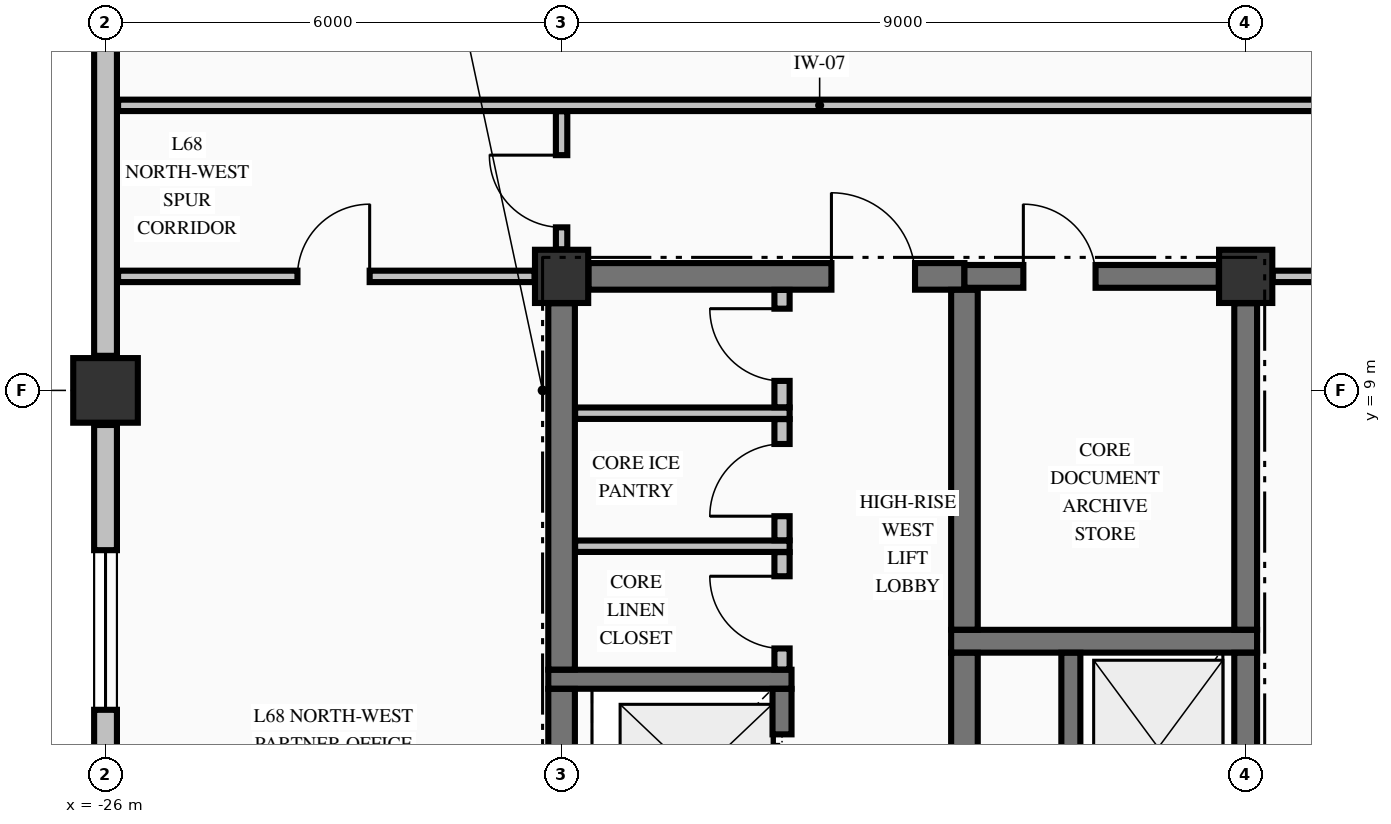
"""IFC4 building model, lengths in metres.
Left out: names, types, materials, properties, quantities, classifications, styles, units other than length and angle.
Written with IfcOpenShell. Run it as: python <this file> out.ifc"""

import sys

from ifc_helpers import new_model, si_unit, direction, frame, frame_2d, origin, origin_2d, place, context, subcontext, project, spatial, rectangle, extrude, element, fill, save


model = new_model("IFC4")
c1 = context("Model", 3, precision=1e-05, world=origin(), true_north=direction((0.0, 1.0)))
c2 = subcontext(c1, "Body", "Model", "MODEL_VIEW")
j1 = project(units=[si_unit("LENGTHUNIT", "METRE"), si_unit("PLANEANGLEUNIT", "RADIAN")], contexts=[c1])
p1 = place(None, origin())
s1 = spatial("IfcSite", under=j1, at=p1, CompositionType="ELEMENT")
p2 = place(p1, origin())
s2 = spatial("IfcBuilding", under=s1, at=p2, CompositionType="ELEMENT")
p3 = place(p2, frame((0.0, 0.0, 257.66)))
s3 = spatial("IfcBuildingStorey", under=s2, at=p3, CompositionType="ELEMENT", Elevation=257.66)
p4 = place(p3, frame((-26.0, 9.0, -0.25), z_axis=(0.0, 0.0, 1.0), x_axis=(1.0, 0.0, 0.0)))
e1 = element("IfcColumn", 1, at=p4, inside=s3, PredefinedType="COLUMN", context=c2, shape_type="SweptSolid", body=[
    extrude(rectangle(XDim=0.85, YDim=0.85, at=origin_2d()), origin(), (0.0, 0.0, 1.0), 3.23),
])
for number, where, z_axis, x_axis in (
    (2, (-20.0, 10.5, -0.25), (0.0, 0.0, 1.0), (1.0, 0.0, 0.0)),
    (3, (-11.0, 10.5, -0.25), (0.0, 0.0, 1.0), (1.0, 0.0, 0.0)),
):
    element("IfcColumn", number, at=place(p3, frame(where, z_axis=z_axis, x_axis=x_axis)), inside=s3, PredefinedType="COLUMN", context=c2, shape_type="SweptSolid", body=[
        extrude(rectangle(XDim=0.7, YDim=0.7, at=origin_2d()), origin(), (0.0, 0.0, 1.0), 3.23),
    ])
p5 = place(p3, frame((-26.0, 8.545, 0.0), z_axis=(0.0, 0.0, 1.0), x_axis=(0.0, -1.0, 0.0)))
e4 = element("IfcWall", 4, at=p5, inside=s3, PredefinedType="STANDARD", context=c2, shape_type="SweptSolid", body=[
    extrude(rectangle(XDim=8.09, YDim=0.3, at=frame_2d((4.045, 0.0))), origin(), (0.0, 0.0, 1.0), 2.372),
])
p6 = place(p5, frame((1.647, 0.0, 0.7)))
e5 = element("IfcOpeningElement", 5, at=p6, cuts=e4, PredefinedType="OPENING", context=c2, shape_type="SweptSolid", body=[
    extrude(rectangle(XDim=2.1, YDim=1.5, at=frame_2d((1.05, 0.75))), frame((0.0, 0.16, 0.0), z_axis=(0.0, -1.0, 0.0), x_axis=(1.0, 0.0, 0.0)), (0.0, 0.0, 1.0), 0.32),
])
p7 = place(p5, frame((4.343, 0.0, 0.7)))
e6 = element("IfcOpeningElement", 6, at=p7, cuts=e4, PredefinedType="OPENING", context=c2, shape_type="SweptSolid", body=[
    extrude(rectangle(XDim=2.1, YDim=1.5, at=frame_2d((1.05, 0.75))), frame((0.0, 0.16, 0.0), z_axis=(0.0, -1.0, 0.0), x_axis=(1.0, 0.0, 0.0)), (0.0, 0.0, 1.0), 0.32),
])
p8 = place(p3, frame((-26.0, 17.545, 0.0), z_axis=(0.0, 0.0, 1.0), x_axis=(0.0, -1.0, 0.0)))
e7 = element("IfcWall", 7, at=p8, inside=s3, PredefinedType="STANDARD", context=c2, shape_type="SweptSolid", body=[
    extrude(rectangle(XDim=8.09, YDim=0.3, at=frame_2d((4.045, 0.0))), origin(), (0.0, 0.0, 1.0), 2.372),
])
p9 = place(p3, frame((-20.175, 5.2, 0.0), z_axis=(0.0, 0.0, 1.0), x_axis=(1.0, 0.0, 0.0)))
e8 = element("IfcWall", 8, at=p9, inside=s3, PredefinedType="SOLIDWALL", context=c2, shape_type="SweptSolid", body=[
    extrude(rectangle(XDim=3.2, YDim=0.25, at=frame_2d((1.6, 0.0))), origin(), (0.0, 0.0, 1.0), 2.98),
])
p10 = place(p3, frame((-14.875, 5.7, 0.0), z_axis=(0.0, 0.0, 1.0), x_axis=(1.0, 0.0, 0.0)))
e9 = element("IfcWall", 9, at=p10, inside=s3, PredefinedType="SHEAR", context=c2, shape_type="SweptSolid", body=[
    extrude(rectangle(XDim=4.025, YDim=0.3, at=frame_2d((2.012, 0.0))), origin(), (0.0, 0.0, 1.0), 2.98),
])
p11 = place(p3, frame((-19.646, 10.5, 0.0), z_axis=(0.0, 0.0, 1.0), x_axis=(1.0, 0.0, 0.0)))
e10 = element("IfcWall", 10, at=p11, inside=s3, PredefinedType="SHEAR", context=c2, shape_type="SweptSolid", body=[
    extrude(rectangle(XDim=4.946, YDim=0.35, at=frame_2d((2.473, 0.0))), origin(), (0.0, 0.0, 1.0), 2.98),
])
p12 = place(p11, frame((3.196, 0.0, 0.0)))
e11 = element("IfcOpeningElement", 11, at=p12, cuts=e10, PredefinedType="OPENING", context=c2, shape_type="SweptSolid", body=[
    extrude(rectangle(XDim=1.1, YDim=2.15, at=frame_2d((0.55, 1.075))), frame((0.0, 0.185, 0.0), z_axis=(0.0, -1.0, 0.0), x_axis=(1.0, 0.0, 0.0)), (0.0, 0.0, 1.0), 0.37),
])
p13 = place(p3, frame((-14.7, 10.5, 0.0), z_axis=(0.0, 0.0, 1.0), x_axis=(1.0, 0.0, 0.0)))
e12 = element("IfcWall", 12, at=p13, inside=s3, PredefinedType="SHEAR", context=c2, shape_type="SweptSolid", body=[
    extrude(rectangle(XDim=3.346, YDim=0.3, at=frame_2d((1.673, 0.0))), origin(), (0.0, 0.0, 1.0), 2.98),
])
p14 = place(p13, frame((0.775, 0.0, 0.0)))
e13 = element("IfcOpeningElement", 13, at=p14, cuts=e12, PredefinedType="OPENING", context=c2, shape_type="SweptSolid", body=[
    extrude(rectangle(XDim=0.95, YDim=2.15, at=frame_2d((0.475, 1.075))), frame((0.0, 0.16, 0.0), z_axis=(0.0, -1.0, 0.0), x_axis=(1.0, 0.0, 0.0)), (0.0, 0.0, 1.0), 0.32),
])
for number, where, z_axis, x_axis in (
    (14, (-19.822, 6.95, 0.0), (0.0, 0.0, 1.0), (1.0, 0.0, 0.0)),
    (15, (-19.822, 8.7, 0.0), (0.0, 0.0, 1.0), (1.0, 0.0, 0.0)),
):
    element("IfcWall", number, at=place(p3, frame(where, z_axis=z_axis, x_axis=x_axis)), inside=s3, PredefinedType="PARTITIONING", context=c2, shape_type="SweptSolid", body=[
        extrude(rectangle(XDim=2.822, YDim=0.15, at=frame_2d((1.411, 0.0))), origin(), (0.0, 0.0, 1.0), 2.98),
    ])
p15 = place(p3, frame((-25.835, 10.5, 0.0), z_axis=(0.0, 0.0, 1.0), x_axis=(1.0, 0.0, 0.0)))
e16 = element("IfcWall", 16, at=p15, inside=s3, PredefinedType="PARTITIONING", context=c2, shape_type="SweptSolid", body=[
    extrude(rectangle(XDim=5.479, YDim=0.15, at=frame_2d((2.74, 0.0))), origin(), (0.0, 0.0, 1.0), 2.98),
])
p16 = place(p15, frame((2.36, 0.0, 0.0)))
e17 = element("IfcOpeningElement", 17, at=p16, cuts=e16, PredefinedType="OPENING", context=c2, shape_type="SweptSolid", body=[
    extrude(rectangle(XDim=0.95, YDim=2.15, at=frame_2d((0.475, 1.075))), frame((0.0, 0.085, 0.0), z_axis=(0.0, -1.0, 0.0), x_axis=(1.0, 0.0, 0.0)), (0.0, 0.0, 1.0), 0.17),
])
p17 = place(p3, frame((-10.644, 10.5, 0.0), z_axis=(0.0, 0.0, 1.0), x_axis=(1.0, 0.0, 0.0)))
e18 = element("IfcWall", 18, at=p17, inside=s3, PredefinedType="PARTITIONING", context=c2, shape_type="SweptSolid", body=[
    extrude(rectangle(XDim=21.288, YDim=0.15, at=frame_2d((10.644, 0.0))), origin(), (0.0, 0.0, 1.0), 2.98),
])
p18 = place(p17, frame((12.744, 0.0, 0.0)))
e19 = element("IfcOpeningElement", 19, at=p18, cuts=e18, PredefinedType="OPENING", context=c2, shape_type="SweptSolid", body=[
    extrude(rectangle(XDim=1.1, YDim=2.15, at=frame_2d((0.55, 1.075))), frame((0.0, 0.085, 0.0), z_axis=(0.0, -1.0, 0.0), x_axis=(1.0, 0.0, 0.0)), (0.0, 0.0, 1.0), 0.17),
])
p19 = place(p3, frame((-25.835, 12.75, 0.0), z_axis=(0.0, 0.0, 1.0), x_axis=(1.0, 0.0, 0.0)))
e20 = element("IfcWall", 20, at=p19, inside=s3, PredefinedType="PARTITIONING", context=c2, shape_type="SweptSolid", body=[
    extrude(rectangle(XDim=45.91, YDim=0.15, at=frame_2d((22.955, 0.0))), origin(), (0.0, 0.0, 1.0), 2.98),
])
p20 = place(p19, frame((18.46, 0.0, 0.0)))
e21 = element("IfcOpeningElement", 21, at=p20, cuts=e20, PredefinedType="OPENING", context=c2, shape_type="SweptSolid", body=[
    extrude(rectangle(XDim=1.05, YDim=2.15, at=frame_2d((0.525, 1.075))), frame((0.0, 0.085, 0.0), z_axis=(0.0, -1.0, 0.0), x_axis=(1.0, 0.0, 0.0)), (0.0, 0.0, 1.0), 0.17),
])
p21 = place(p19, frame((28.86, 0.0, 0.0)))
e22 = element("IfcOpeningElement", 22, at=p21, cuts=e20, PredefinedType="OPENING", context=c2, shape_type="SweptSolid", body=[
    extrude(rectangle(XDim=1.05, YDim=2.15, at=frame_2d((0.525, 1.075))), frame((0.0, 0.085, 0.0), z_axis=(0.0, -1.0, 0.0), x_axis=(1.0, 0.0, 0.0)), (0.0, 0.0, 1.0), 0.17),
])
p22 = place(p19, frame((39.16, 0.0, 0.0)))
e23 = element("IfcOpeningElement", 23, at=p22, cuts=e20, PredefinedType="OPENING", context=c2, shape_type="SweptSolid", body=[
    extrude(rectangle(XDim=1.05, YDim=2.15, at=frame_2d((0.525, 1.075))), frame((0.0, 0.085, 0.0), z_axis=(0.0, -1.0, 0.0), x_axis=(1.0, 0.0, 0.0)), (0.0, 0.0, 1.0), 0.17),
])
p23 = place(p3, frame((-20.0, 2.777, 0.0), z_axis=(0.0, 0.0, 1.0), x_axis=(0.0, 1.0, 0.0)))
e24 = element("IfcWall", 24, at=p23, inside=s3, PredefinedType="SHEAR", context=c2, shape_type="SweptSolid", body=[
    extrude(rectangle(XDim=2.296, YDim=0.35, at=frame_2d((1.148, 0.0))), origin(), (0.0, 0.0, 1.0), 2.98),
])
p24 = place(p3, frame((-20.0, 5.327, 0.0), z_axis=(0.0, 0.0, 1.0), x_axis=(0.0, 1.0, 0.0)))
e25 = element("IfcWall", 25, at=p24, inside=s3, PredefinedType="SHEAR", context=c2, shape_type="SweptSolid", body=[
    extrude(rectangle(XDim=4.819, YDim=0.35, at=frame_2d((2.41, 0.0))), origin(), (0.0, 0.0, 1.0), 2.98),
])
p25 = place(p3, frame((-17.1, 2.777, 0.0), z_axis=(0.0, 0.0, 1.0), x_axis=(0.0, 1.0, 0.0)))
e26 = element("IfcWall", 26, at=p25, inside=s3, PredefinedType="SOLIDWALL", context=c2, shape_type="SweptSolid", body=[
    extrude(rectangle(XDim=2.296, YDim=0.25, at=frame_2d((1.148, 0.0))), origin(), (0.0, 0.0, 1.0), 2.98),
])
p26 = place(p25, frame((0.598, 0.0, 0.0)))
e27 = element("IfcOpeningElement", 27, at=p26, cuts=e26, PredefinedType="OPENING", context=c2, shape_type="SweptSolid", body=[
    extrude(rectangle(XDim=1.1, YDim=2.2, at=frame_2d((0.55, 1.1))), frame((0.0, 0.135, 0.0), z_axis=(0.0, -1.0, 0.0), x_axis=(1.0, 0.0, 0.0)), (0.0, 0.0, 1.0), 0.27),
])
p27 = place(p3, frame((-14.7, 3.052, 0.0), z_axis=(0.0, 0.0, 1.0), x_axis=(0.0, 1.0, 0.0)))
e28 = element("IfcWall", 28, at=p27, inside=s3, PredefinedType="SHEAR", context=c2, shape_type="SweptSolid", body=[
    extrude(rectangle(XDim=2.496, YDim=0.35, at=frame_2d((1.248, 0.0))), origin(), (0.0, 0.0, 1.0), 2.98),
])
p28 = place(p3, frame((-14.7, 5.852, 0.0), z_axis=(0.0, 0.0, 1.0), x_axis=(0.0, 1.0, 0.0)))
e29 = element("IfcWall", 29, at=p28, inside=s3, PredefinedType="SHEAR", context=c2, shape_type="SweptSolid", body=[
    extrude(rectangle(XDim=4.471, YDim=0.35, at=frame_2d((2.235, 0.0))), origin(), (0.0, 0.0, 1.0), 2.98),
])
p29 = place(p3, frame((-13.3, 3.052, 0.0), z_axis=(0.0, 0.0, 1.0), x_axis=(0.0, 1.0, 0.0)))
e30 = element("IfcWall", 30, at=p29, inside=s3, PredefinedType="SOLIDWALL", context=c2, shape_type="SweptSolid", body=[
    extrude(rectangle(XDim=2.496, YDim=0.25, at=frame_2d((1.248, 0.0))), origin(), (0.0, 0.0, 1.0), 2.98),
])
p30 = place(p3, frame((-11.0, 3.052, 0.0), z_axis=(0.0, 0.0, 1.0), x_axis=(0.0, 1.0, 0.0)))
e31 = element("IfcWall", 31, at=p30, inside=s3, PredefinedType="SHEAR", context=c2, shape_type="SweptSolid", body=[
    extrude(rectangle(XDim=2.496, YDim=0.3, at=frame_2d((1.248, 0.0))), origin(), (0.0, 0.0, 1.0), 2.98),
])
p31 = place(p3, frame((-11.0, 5.852, 0.0), z_axis=(0.0, 0.0, 1.0), x_axis=(0.0, 1.0, 0.0)))
e32 = element("IfcWall", 32, at=p31, inside=s3, PredefinedType="SHEAR", context=c2, shape_type="SweptSolid", body=[
    extrude(rectangle(XDim=4.294, YDim=0.3, at=frame_2d((2.147, 0.0))), origin(), (0.0, 0.0, 1.0), 2.98),
])
p32 = place(p3, frame((-20.0, 10.856, 0.0), z_axis=(0.0, 0.0, 1.0), x_axis=(0.0, 1.0, 0.0)))
e33 = element("IfcWall", 33, at=p32, inside=s3, PredefinedType="PARTITIONING", context=c2, shape_type="SweptSolid", body=[
    extrude(rectangle(XDim=1.816, YDim=0.15, at=frame_2d((0.908, 0.0))), origin(), (0.0, 0.0, 1.0), 2.98),
])
p33 = place(p32, frame((0.289, 0.0, 0.0)))
e34 = element("IfcOpeningElement", 34, at=p33, cuts=e33, PredefinedType="OPENING", context=c2, shape_type="SweptSolid", body=[
    extrude(rectangle(XDim=0.95, YDim=2.15, at=frame_2d((0.475, 1.075))), frame((0.0, 0.085, 0.0), z_axis=(0.0, -1.0, 0.0), x_axis=(1.0, 0.0, 0.0)), (0.0, 0.0, 1.0), 0.17),
])
p34 = place(p3, frame((-17.1, 5.328, 0.0), z_axis=(0.0, 0.0, 1.0), x_axis=(0.0, 1.0, 0.0)))
e35 = element("IfcWall", 35, at=p34, inside=s3, PredefinedType="PARTITIONING", context=c2, shape_type="SweptSolid", body=[
    extrude(rectangle(XDim=1.544, YDim=0.2, at=frame_2d((0.772, 0.0))), origin(), (0.0, 0.0, 1.0), 2.98),
])
p35 = place(p34, frame((0.277, 0.0, 0.0)))
e36 = element("IfcOpeningElement", 36, at=p35, cuts=e35, PredefinedType="OPENING", context=c2, shape_type="SweptSolid", body=[
    extrude(rectangle(XDim=0.95, YDim=2.15, at=frame_2d((0.475, 1.075))), frame((0.0, 0.11, 0.0), z_axis=(0.0, -1.0, 0.0), x_axis=(1.0, 0.0, 0.0)), (0.0, 0.0, 1.0), 0.22),
])
p36 = place(p3, frame((-17.1, 7.028, 0.0), z_axis=(0.0, 0.0, 1.0), x_axis=(0.0, 1.0, 0.0)))
e37 = element("IfcWall", 37, at=p36, inside=s3, PredefinedType="PARTITIONING", context=c2, shape_type="SweptSolid", body=[
    extrude(rectangle(XDim=1.594, YDim=0.2, at=frame_2d((0.797, 0.0))), origin(), (0.0, 0.0, 1.0), 2.98),
])
p37 = place(p36, frame((0.317, 0.0, 0.0)))
e38 = element("IfcOpeningElement", 38, at=p37, cuts=e37, PredefinedType="OPENING", context=c2, shape_type="SweptSolid", body=[
    extrude(rectangle(XDim=0.95, YDim=2.15, at=frame_2d((0.475, 1.075))), frame((0.0, 0.11, 0.0), z_axis=(0.0, -1.0, 0.0), x_axis=(1.0, 0.0, 0.0)), (0.0, 0.0, 1.0), 0.22),
])
p38 = place(p3, frame((-17.1, 8.778, 0.0), z_axis=(0.0, 0.0, 1.0), x_axis=(0.0, 1.0, 0.0)))
e39 = element("IfcWall", 39, at=p38, inside=s3, PredefinedType="PARTITIONING", context=c2, shape_type="SweptSolid", body=[
    extrude(rectangle(XDim=1.544, YDim=0.2, at=frame_2d((0.772, 0.0))), origin(), (0.0, 0.0, 1.0), 2.98),
])
p39 = place(p38, frame((0.347, 0.0, 0.0)))
e40 = element("IfcOpeningElement", 40, at=p39, cuts=e39, PredefinedType="OPENING", context=c2, shape_type="SweptSolid", body=[
    extrude(rectangle(XDim=0.95, YDim=2.15, at=frame_2d((0.475, 1.075))), frame((0.0, 0.11, 0.0), z_axis=(0.0, -1.0, 0.0), x_axis=(1.0, 0.0, 0.0)), (0.0, 0.0, 1.0), 0.22),
])
p40 = place(p6, origin())
e41 = element("IfcWindow", 41, at=p40, inside=s3, PartitioningType="SINGLE_PANEL", PredefinedType="WINDOW", context=c2, shape_type="SweptSolid", body=[
    extrude(rectangle(XDim=2.1, YDim=1.5, at=frame_2d((1.05, 0.75))), frame((0.0, 0.03, 0.0), z_axis=(0.0, -1.0, 0.0), x_axis=(1.0, 0.0, 0.0)), (0.0, 0.0, 1.0), 0.06),
])
fill(e5, e41)
p41 = place(p14, origin())
e42 = element("IfcDoor", 42, at=p41, inside=s3, OperationType="SINGLE_SWING_LEFT", PredefinedType="DOOR", context=c2, shape_type="SweptSolid", body=[
    extrude(rectangle(XDim=0.95, YDim=2.15, at=frame_2d((0.475, 1.075))), frame((0.0, 0.025, 0.0), z_axis=(0.0, -1.0, 0.0), x_axis=(1.0, 0.0, 0.0)), (0.0, 0.0, 1.0), 0.05),
])
fill(e13, e42)
p42 = place(p26, origin())
e43 = element("IfcDoor", 43, at=p42, inside=s3, OperationType="SLIDING_TO_LEFT", PredefinedType="DOOR", context=c2, shape_type="SweptSolid", body=[
    extrude(rectangle(XDim=1.1, YDim=2.2, at=frame_2d((0.55, 1.1))), frame((0.0, 0.025, 0.0), z_axis=(0.0, -1.0, 0.0), x_axis=(1.0, 0.0, 0.0)), (0.0, 0.0, 1.0), 0.05),
])
fill(e27, e43)
p43 = place(p12, origin())
e44 = element("IfcDoor", 44, at=p43, inside=s3, OperationType="SINGLE_SWING_LEFT", PredefinedType="DOOR", context=c2, shape_type="SweptSolid", body=[
    extrude(rectangle(XDim=1.1, YDim=2.15, at=frame_2d((0.55, 1.075))), frame((0.0, 0.025, 0.0), z_axis=(0.0, -1.0, 0.0), x_axis=(1.0, 0.0, 0.0)), (0.0, 0.0, 1.0), 0.05),
])
fill(e11, e44)
p44 = place(p39, origin())
e45 = element("IfcDoor", 45, at=p44, inside=s3, OperationType="SINGLE_SWING_RIGHT", PredefinedType="DOOR", context=c2, shape_type="SweptSolid", body=[
    extrude(rectangle(XDim=0.95, YDim=2.15, at=frame_2d((0.475, 1.075))), frame((0.0, 0.025, 0.0), z_axis=(0.0, -1.0, 0.0), x_axis=(1.0, 0.0, 0.0)), (0.0, 0.0, 1.0), 0.05),
])
fill(e40, e45)
p45 = place(p37, origin())
e46 = element("IfcDoor", 46, at=p45, inside=s3, OperationType="SINGLE_SWING_LEFT", PredefinedType="DOOR", context=c2, shape_type="SweptSolid", body=[
    extrude(rectangle(XDim=0.95, YDim=2.15, at=frame_2d((0.475, 1.075))), frame((0.0, 0.025, 0.0), z_axis=(0.0, -1.0, 0.0), x_axis=(1.0, 0.0, 0.0)), (0.0, 0.0, 1.0), 0.05),
])
fill(e38, e46)
p46 = place(p35, origin())
e47 = element("IfcDoor", 47, at=p46, inside=s3, OperationType="SINGLE_SWING_RIGHT", PredefinedType="DOOR", context=c2, shape_type="SweptSolid", body=[
    extrude(rectangle(XDim=0.95, YDim=2.15, at=frame_2d((0.475, 1.075))), frame((0.0, 0.025, 0.0), z_axis=(0.0, -1.0, 0.0), x_axis=(1.0, 0.0, 0.0)), (0.0, 0.0, 1.0), 0.05),
])
fill(e36, e47)
p47 = place(p33, origin())
e48 = element("IfcDoor", 48, at=p47, inside=s3, OperationType="SINGLE_SWING_RIGHT", PredefinedType="DOOR", context=c2, shape_type="SweptSolid", body=[
    extrude(rectangle(XDim=0.95, YDim=2.15, at=frame_2d((0.475, 1.075))), frame((0.0, 0.025, 0.0), z_axis=(0.0, -1.0, 0.0), x_axis=(1.0, 0.0, 0.0)), (0.0, 0.0, 1.0), 0.05),
])
fill(e34, e48)
p48 = place(p16, origin())
e49 = element("IfcDoor", 49, at=p48, inside=s3, OperationType="SINGLE_SWING_RIGHT", PredefinedType="DOOR", context=c2, shape_type="SweptSolid", body=[
    extrude(rectangle(XDim=0.95, YDim=2.15, at=frame_2d((0.475, 1.075))), frame((0.0, 0.025, 0.0), z_axis=(0.0, -1.0, 0.0), x_axis=(1.0, 0.0, 0.0)), (0.0, 0.0, 1.0), 0.05),
])
fill(e17, e49)
save(model, sys.argv[1])
